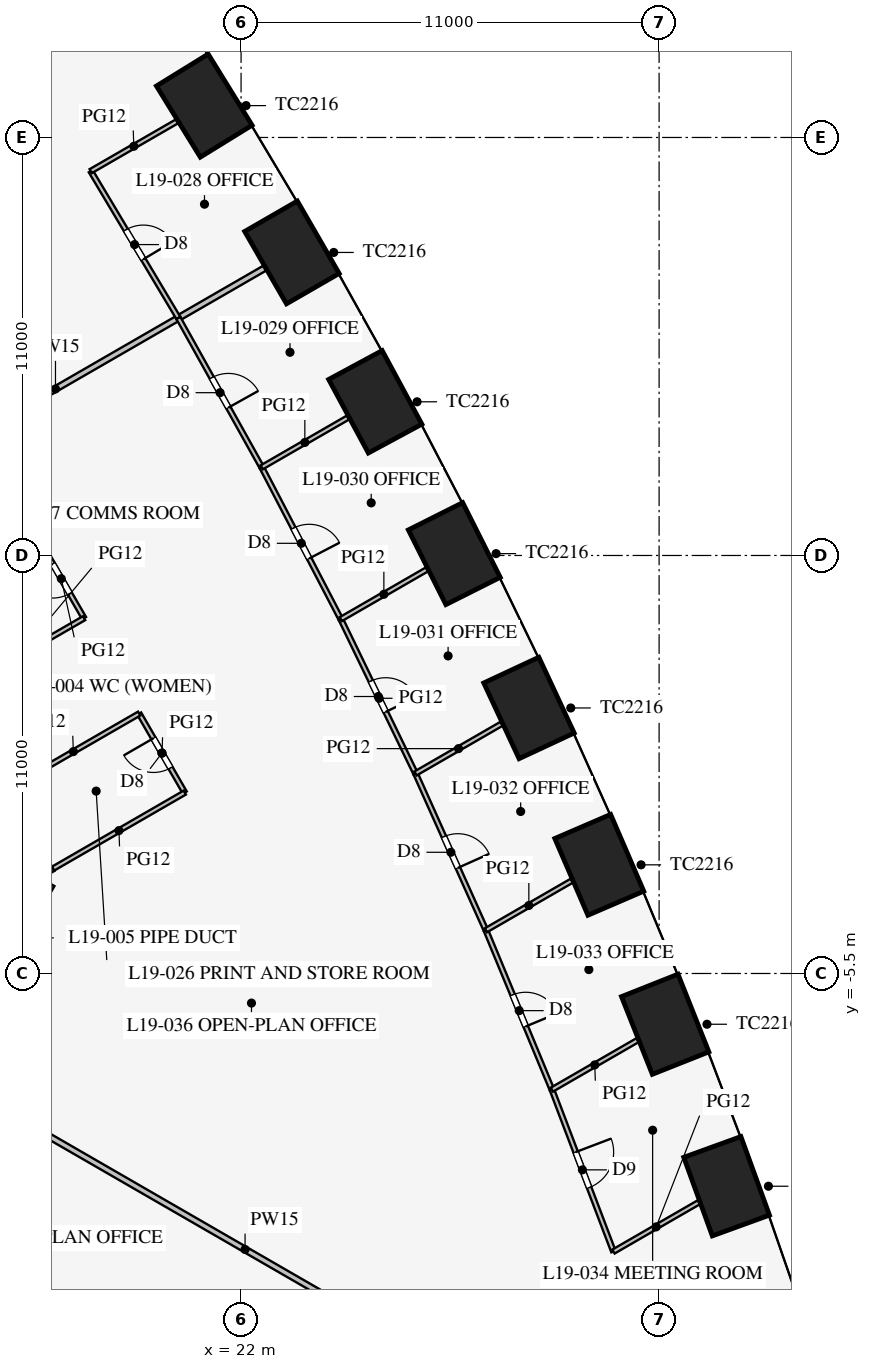
"""IFC4 building model, lengths in metres.
Left out: names, types, materials, properties, quantities, classifications, styles, units other than length and angle.
Written with IfcOpenShell. Run it as: python <this file> out.ifc"""

import sys

from ifc_helpers import new_model, si_unit, direction, frame, frame_2d, origin, origin_2d, place, context, subcontext, project, spatial, rectangle, extrude, element, fill, save


model = new_model("IFC4")
c1 = context("Model", 3, precision=1e-05, world=origin(), true_north=direction((0.0, 1.0)))
c2 = subcontext(c1, "Body", "Model", "MODEL_VIEW")
j1 = project(units=[si_unit("LENGTHUNIT", "METRE"), si_unit("PLANEANGLEUNIT", "RADIAN")], contexts=[c1])
p1 = place(None, origin())
s1 = spatial("IfcSite", under=j1, at=p1, CompositionType="ELEMENT")
p2 = place(p1, origin())
s2 = spatial("IfcBuilding", under=s1, at=p2, CompositionType="ELEMENT")
p3 = place(p2, frame((0.0, 0.0, 83.7)))
s3 = spatial("IfcBuildingStorey", under=s2, at=p3, CompositionType="ELEMENT", Elevation=83.7)
for number, where, z_axis, x_axis in (
    (1, (34.776, -11.099, 0.0), (0.0, 0.0, 1.0), (-0.342, 0.94, 0.0)),
    (2, (33.16, -6.836, 0.0), (0.0, 0.0, 1.0), (-0.369, 0.929, 0.0)),
    (3, (31.426, -2.641, 0.0), (0.0, 0.0, 1.0), (-0.396, 0.918, 0.0)),
    (4, (29.576, 1.487, 0.0), (0.0, 0.0, 1.0), (-0.423, 0.906, 0.0)),
    (5, (27.611, 5.549, 0.0), (0.0, 0.0, 1.0), (-0.449, 0.894, 0.0)),
    (6, (25.531, 9.544, 0.0), (0.0, 0.0, 1.0), (-0.475, 0.88, 0.0)),
    (7, (23.338, 13.474, 0.0), (0.0, 0.0, 1.0), (-0.5, 0.866, 0.0)),
    (8, (21.031, 17.339, 0.0), (0.0, 0.0, 1.0), (-0.525, 0.851, 0.0)),
):
    element("IfcColumn", number, at=place(p3, frame(where, z_axis=z_axis, x_axis=x_axis)), inside=s3, PredefinedType="COLUMN", context=c2, shape_type="SweptSolid", body=[
        extrude(rectangle(XDim=2.2, YDim=1.6, at=origin_2d()), origin(), (0.0, 0.0, 1.0), 4.2),
    ])
p4 = place(p3, frame((10.97, -13.0, 0.0), z_axis=(0.0, 0.0, 1.0), x_axis=(0.499995765644, 0.866027848477, 0.0)))
e9 = element("IfcWall", 9, at=p4, inside=s3, PredefinedType="SHEAR", context=c2, shape_type="SweptSolid", body=[
    extrude(rectangle(XDim=11.547, YDim=0.8, at=frame_2d((5.773, 0.0))), origin(), (0.0, 0.0, 1.0), 4.2),
])
p5 = place(p3, frame((16.743, -3.0, 0.0), z_axis=(0.0, 0.0, 1.0), x_axis=(-0.500002442456, 0.866023993627, 0.0)))
e10 = element("IfcWall", 10, at=p5, inside=s3, PredefinedType="SHEAR", context=c2, shape_type="SweptSolid", body=[
    extrude(rectangle(XDim=21.939, YDim=0.8, at=frame_2d((10.97, 0.0))), origin(), (0.0, 0.0, 1.0), 4.2),
])
p6 = place(p5, frame((17.27, 0.0, 0.0)))
e11 = element("IfcOpeningElement", 11, at=p6, cuts=e10, PredefinedType="OPENING", context=c2, shape_type="SweptSolid", body=[
    extrude(rectangle(XDim=1.2, YDim=2.1, at=frame_2d((0.6, 1.05))), frame((0.0, 0.41, 0.0), z_axis=(0.0, -1.0, 0.0), x_axis=(1.0, 0.0, 0.0)), (0.0, 0.0, 1.0), 0.82),
])
p7 = place(p5, frame((3.47, 0.0, 0.0)))
e12 = element("IfcOpeningElement", 12, at=p7, cuts=e10, PredefinedType="OPENING", context=c2, shape_type="SweptSolid", body=[
    extrude(rectangle(XDim=1.2, YDim=2.1, at=frame_2d((0.6, 1.05))), frame((0.0, 0.41, 0.0), z_axis=(0.0, -1.0, 0.0), x_axis=(1.0, 0.0, 0.0)), (0.0, 0.0, 1.0), 0.82),
])
p8 = place(p3, frame((14.203, -8.2, 0.0), z_axis=(0.0, 0.0, 1.0), x_axis=(0.866024965723, -0.500000758745, 0.0)))
e13 = element("IfcWall", 13, at=p8, inside=s3, PredefinedType="PARTITIONING", context=c2, shape_type="SweptSolid", body=[
    extrude(rectangle(XDim=18.25, YDim=0.15, at=frame_2d((9.125, 0.0))), origin(), (0.0, 0.0, 1.0), 2.3),
])
p9 = place(p3, frame((11.613, 6.705, 0.0), z_axis=(0.0, 0.0, 1.0), x_axis=(0.866029791586, 0.499992400027, 0.0)))
e14 = element("IfcWall", 14, at=p9, inside=s3, PredefinedType="PARTITIONING", context=c2, shape_type="SweptSolid", body=[
    extrude(rectangle(XDim=12.709, YDim=0.15, at=frame_2d((6.354, 0.0))), origin(), (0.0, 0.0, 1.0), 2.6),
])
p10 = place(p3, frame((20.519, -0.74, 0.0), z_axis=(0.0, 0.0, 1.0), x_axis=(-0.499957262057, 0.866050077142, 0.0)))
e15 = element("IfcWall", 15, at=p10, inside=s3, PredefinedType="PARTITIONING", context=c2, shape_type="SweptSolid", body=[
    extrude(rectangle(XDim=2.4, YDim=0.12, at=frame_2d((1.2, 0.0))), origin(), (0.0, 0.0, 1.0), 2.9),
])
p11 = place(p10, frame((0.75, 0.0, 0.15)))
e16 = element("IfcOpeningElement", 16, at=p11, cuts=e15, PredefinedType="OPENING", context=c2, shape_type="SweptSolid", body=[
    extrude(rectangle(XDim=0.9, YDim=2.1, at=frame_2d((0.45, 1.05))), frame((0.0, 0.07, 0.0), z_axis=(0.0, -1.0, 0.0), x_axis=(1.0, 0.0, 0.0)), (0.0, 0.0, 1.0), 0.14),
])
p12 = place(p3, frame((17.869, 3.85, 0.0), z_axis=(0.0, 0.0, 1.0), x_axis=(-0.500001309137, 0.866024647952, 0.0)))
e17 = element("IfcWall", 17, at=p12, inside=s3, PredefinedType="PARTITIONING", context=c2, shape_type="SweptSolid", body=[
    extrude(rectangle(XDim=2.4, YDim=0.12, at=frame_2d((1.2, 0.0))), origin(), (0.0, 0.0, 1.0), 2.9),
])
p13 = place(p12, frame((0.75, 0.0, 0.15)))
e18 = element("IfcOpeningElement", 18, at=p13, cuts=e17, PredefinedType="OPENING", context=c2, shape_type="SweptSolid", body=[
    extrude(rectangle(XDim=0.9, YDim=2.1, at=frame_2d((0.45, 1.05))), frame((0.0, 0.07, 0.0), z_axis=(0.0, -1.0, 0.0), x_axis=(1.0, 0.0, 0.0)), (0.0, 0.0, 1.0), 0.14),
])
for number, where, z_axis, x_axis in (
    (19, (17.055, -2.74, 0.0), (0.0, 0.0, 1.0), (0.866, 0.5, 0.0)),
    (20, (14.405, 1.85, 0.0), (0.0, 0.0, 1.0), (0.866, 0.5, 0.0)),
    (21, (15.855, -0.661, 0.0), (0.0, 0.0, 1.0), (0.866, 0.5, 0.0)),
):
    element("IfcWall", number, at=place(p3, frame(where, z_axis=z_axis, x_axis=x_axis)), inside=s3, PredefinedType="PARTITIONING", context=c2, shape_type="SweptSolid", body=[
        extrude(rectangle(XDim=4.0, YDim=0.12, at=frame_2d((2.0, 0.0))), origin(), (0.0, 0.0, 1.0), 2.9),
    ])
p14 = place(p3, frame((20.351, 11.749, 0.0), z_axis=(0.0, 0.0, 1.0), x_axis=(-0.51252396108, 0.858672923364, 0.0)))
e22 = element("IfcWall", 22, at=p14, inside=s3, PredefinedType="PARTITIONING", context=c2, shape_type="SweptSolid", body=[
    extrude(rectangle(XDim=4.5, YDim=0.12, at=frame_2d((2.25, 0.0))), origin(), (0.0, 0.0, 1.0), 2.9),
])
p15 = place(p14, frame((1.8, 0.0, 0.15)))
e23 = element("IfcOpeningElement", 23, at=p15, cuts=e22, PredefinedType="OPENING", context=c2, shape_type="SweptSolid", body=[
    extrude(rectangle(XDim=0.9, YDim=2.1, at=frame_2d((0.45, 1.05))), frame((0.0, 0.07, 0.0), z_axis=(0.0, -1.0, 0.0), x_axis=(1.0, 0.0, 0.0)), (0.0, 0.0, 1.0), 0.14),
])
p16 = place(p3, frame((26.591, -0.236, 0.0), z_axis=(0.0, 0.0, 1.0), x_axis=(-0.435857917556, 0.900015486369, 0.0)))
e24 = element("IfcWall", 24, at=p16, inside=s3, PredefinedType="PARTITIONING", context=c2, shape_type="SweptSolid", body=[
    extrude(rectangle(XDim=4.512, YDim=0.12, at=frame_2d((2.256, 0.0))), origin(), (0.0, 0.0, 1.0), 2.9),
])
p17 = place(p16, frame((1.8, 0.0, 0.15)))
e25 = element("IfcOpeningElement", 25, at=p17, cuts=e24, PredefinedType="OPENING", context=c2, shape_type="SweptSolid", body=[
    extrude(rectangle(XDim=0.9, YDim=2.1, at=frame_2d((0.45, 1.05))), frame((0.0, 0.07, 0.0), z_axis=(0.0, -1.0, 0.0), x_axis=(1.0, 0.0, 0.0)), (0.0, 0.0, 1.0), 0.14),
])
p18 = place(p3, frame((28.443, -4.363, 0.0), z_axis=(0.0, 0.0, 1.0), x_axis=(-0.409495979977, 0.912311921649, 0.0)))
e26 = element("IfcWall", 26, at=p18, inside=s3, PredefinedType="PARTITIONING", context=c2, shape_type="SweptSolid", body=[
    extrude(rectangle(XDim=4.523, YDim=0.12, at=frame_2d((2.262, 0.0))), origin(), (0.0, 0.0, 1.0), 2.9),
])
p19 = place(p18, frame((1.8, 0.0, 0.15)))
e27 = element("IfcOpeningElement", 27, at=p19, cuts=e26, PredefinedType="OPENING", context=c2, shape_type="SweptSolid", body=[
    extrude(rectangle(XDim=0.9, YDim=2.1, at=frame_2d((0.45, 1.05))), frame((0.0, 0.07, 0.0), z_axis=(0.0, -1.0, 0.0), x_axis=(1.0, 0.0, 0.0)), (0.0, 0.0, 1.0), 0.14),
])
p20 = place(p3, frame((30.179, -8.557, 0.0), z_axis=(0.0, 0.0, 1.0), x_axis=(-0.382594071331, 0.923916542001, 0.0)))
e28 = element("IfcWall", 28, at=p20, inside=s3, PredefinedType="PARTITIONING", context=c2, shape_type="SweptSolid", body=[
    extrude(rectangle(XDim=4.539, YDim=0.12, at=frame_2d((2.27, 0.0))), origin(), (0.0, 0.0, 1.0), 2.9),
])
p21 = place(p20, frame((1.8, 0.0, 0.15)))
e29 = element("IfcOpeningElement", 29, at=p21, cuts=e28, PredefinedType="OPENING", context=c2, shape_type="SweptSolid", body=[
    extrude(rectangle(XDim=0.9, YDim=2.1, at=frame_2d((0.45, 1.05))), frame((0.0, 0.07, 0.0), z_axis=(0.0, -1.0, 0.0), x_axis=(1.0, 0.0, 0.0)), (0.0, 0.0, 1.0), 0.14),
])
p22 = place(p3, frame((31.799, -12.817, 0.0), z_axis=(0.0, 0.0, 1.0), x_axis=(-0.355369393324, 0.934725946087, 0.0)))
e30 = element("IfcWall", 30, at=p22, inside=s3, PredefinedType="PARTITIONING", context=c2, shape_type="SweptSolid", body=[
    extrude(rectangle(XDim=4.558, YDim=0.12, at=frame_2d((2.279, 0.0))), origin(), (0.0, 0.0, 1.0), 2.9),
])
p23 = place(p22, frame((1.8, 0.0, 0.15)))
e31 = element("IfcOpeningElement", 31, at=p23, cuts=e30, PredefinedType="OPENING", context=c2, shape_type="SweptSolid", body=[
    extrude(rectangle(XDim=1.0, YDim=2.1, at=frame_2d((0.5, 1.05))), frame((0.0, 0.07, 0.0), z_axis=(0.0, -1.0, 0.0), x_axis=(1.0, 0.0, 0.0)), (0.0, 0.0, 1.0), 0.14),
])
p24 = place(p3, frame((22.544, 7.82, 0.0), z_axis=(0.0, 0.0, 1.0), x_axis=(-0.487373854787, 0.873193406795, 0.0)))
e32 = element("IfcWall", 32, at=p24, inside=s3, PredefinedType="PARTITIONING", context=c2, shape_type="SweptSolid", body=[
    extrude(rectangle(XDim=4.5, YDim=0.12, at=frame_2d((2.25, 0.0))), origin(), (0.0, 0.0, 1.0), 2.9),
])
p25 = place(p24, frame((1.8, 0.0, 0.15)))
e33 = element("IfcOpeningElement", 33, at=p25, cuts=e32, PredefinedType="OPENING", context=c2, shape_type="SweptSolid", body=[
    extrude(rectangle(XDim=0.9, YDim=2.1, at=frame_2d((0.45, 1.05))), frame((0.0, 0.07, 0.0), z_axis=(0.0, -1.0, 0.0), x_axis=(1.0, 0.0, 0.0)), (0.0, 0.0, 1.0), 0.14),
])
p26 = place(p3, frame((24.624, 3.824, 0.0), z_axis=(0.0, 0.0, 1.0), x_axis=(-0.461810056307, 0.886978845235, 0.0)))
e34 = element("IfcWall", 34, at=p26, inside=s3, PredefinedType="PARTITIONING", context=c2, shape_type="SweptSolid", body=[
    extrude(rectangle(XDim=4.504, YDim=0.12, at=frame_2d((2.252, 0.0))), origin(), (0.0, 0.0, 1.0), 2.9),
])
p27 = place(p26, frame((1.8, 0.0, 0.15)))
e35 = element("IfcOpeningElement", 35, at=p27, cuts=e34, PredefinedType="OPENING", context=c2, shape_type="SweptSolid", body=[
    extrude(rectangle(XDim=0.9, YDim=2.1, at=frame_2d((0.45, 1.05))), frame((0.0, 0.07, 0.0), z_axis=(0.0, -1.0, 0.0), x_axis=(1.0, 0.0, 0.0)), (0.0, 0.0, 1.0), 0.14),
])
p28 = place(p3, frame((18.044, 15.614, 0.0), z_axis=(0.0, 0.0, 1.0), x_axis=(0.865991553875, 0.500058625179, 0.0)))
e36 = element("IfcWall", 36, at=p28, inside=s3, PredefinedType="PARTITIONING", context=c2, shape_type="SweptSolid", body=[
    extrude(rectangle(XDim=2.619, YDim=0.12, at=frame_2d((1.31, 0.0))), origin(), (0.0, 0.0, 1.0), 2.6),
])
p29 = place(p3, frame((26.591, -0.236, 0.0), z_axis=(0.0, 0.0, 1.0), x_axis=(0.866033156767, 0.499986571201, 0.0)))
e37 = element("IfcWall", 37, at=p29, inside=s3, PredefinedType="PARTITIONING", context=c2, shape_type="SweptSolid", body=[
    extrude(rectangle(XDim=2.614, YDim=0.12, at=frame_2d((1.307, 0.0))), origin(), (0.0, 0.0, 1.0), 2.4),
])
p30 = place(p3, frame((28.443, -4.363, 0.0), z_axis=(0.0, 0.0, 1.0), x_axis=(0.866017274468, 0.500014080125, 0.0)))
e38 = element("IfcWall", 38, at=p30, inside=s3, PredefinedType="PARTITIONING", context=c2, shape_type="SweptSolid", body=[
    extrude(rectangle(XDim=2.609, YDim=0.12, at=frame_2d((1.304, 0.0))), origin(), (0.0, 0.0, 1.0), 2.4),
])
p31 = place(p3, frame((30.179, -8.557, 0.0), z_axis=(0.0, 0.0, 1.0), x_axis=(0.866052820039, 0.499952510647, 0.0)))
e39 = element("IfcWall", 39, at=p31, inside=s3, PredefinedType="PARTITIONING", context=c2, shape_type="SweptSolid", body=[
    extrude(rectangle(XDim=2.603, YDim=0.12, at=frame_2d((1.301, 0.0))), origin(), (0.0, 0.0, 1.0), 2.6),
])
p32 = place(p3, frame((31.799, -12.817, 0.0), z_axis=(0.0, 0.0, 1.0), x_axis=(0.866046148833, 0.4999640668, 0.0)))
e40 = element("IfcWall", 40, at=p32, inside=s3, PredefinedType="PARTITIONING", context=c2, shape_type="SweptSolid", body=[
    extrude(rectangle(XDim=2.595, YDim=0.12, at=frame_2d((1.297, 0.0))), origin(), (0.0, 0.0, 1.0), 2.9),
])
p33 = place(p3, frame((22.544, 7.82, 0.0), z_axis=(0.0, 0.0, 1.0), x_axis=(0.866031916153, 0.499988720078, 0.0)))
e41 = element("IfcWall", 41, at=p33, inside=s3, PredefinedType="PARTITIONING", context=c2, shape_type="SweptSolid", body=[
    extrude(rectangle(XDim=2.619, YDim=0.12, at=frame_2d((1.31, 0.0))), origin(), (0.0, 0.0, 1.0), 2.6),
])
p34 = place(p3, frame((24.624, 3.824, 0.0), z_axis=(0.0, 0.0, 1.0), x_axis=(0.866053563643, 0.499951222523, 0.0)))
e42 = element("IfcWall", 42, at=p34, inside=s3, PredefinedType="PARTITIONING", context=c2, shape_type="SweptSolid", body=[
    extrude(rectangle(XDim=2.617, YDim=0.12, at=frame_2d((1.309, 0.0))), origin(), (0.0, 0.0, 1.0), 2.6),
])
p35 = place(p11, origin())
e43 = element("IfcDoor", 43, at=p35, inside=s3, OperationType="SINGLE_SWING_RIGHT", PredefinedType="DOOR", context=c2, shape_type="SweptSolid", body=[
    extrude(rectangle(XDim=0.9, YDim=2.1, at=frame_2d((0.45, 1.05))), frame((0.0, 0.025, 0.0), z_axis=(0.0, -1.0, 0.0), x_axis=(1.0, 0.0, 0.0)), (0.0, 0.0, 1.0), 0.05),
])
fill(e16, e43)
p36 = place(p13, origin())
e44 = element("IfcDoor", 44, at=p36, inside=s3, OperationType="SINGLE_SWING_RIGHT", PredefinedType="DOOR", context=c2, shape_type="SweptSolid", body=[
    extrude(rectangle(XDim=0.9, YDim=2.1, at=frame_2d((0.45, 1.05))), frame((0.0, 0.025, 0.0), z_axis=(0.0, -1.0, 0.0), x_axis=(1.0, 0.0, 0.0)), (0.0, 0.0, 1.0), 0.05),
])
fill(e18, e44)
p37 = place(p15, frame((0.9, 0.0, 0.0), z_axis=(0.0, 0.0, 1.0), x_axis=(-1.0, 0.0, 0.0)))
e45 = element("IfcDoor", 45, at=p37, inside=s3, OperationType="SINGLE_SWING_RIGHT", PredefinedType="DOOR", context=c2, shape_type="SweptSolid", body=[
    extrude(rectangle(XDim=0.9, YDim=2.1, at=frame_2d((0.45, 1.05))), frame((0.0, 0.025, 0.0), z_axis=(0.0, -1.0, 0.0), x_axis=(1.0, 0.0, 0.0)), (0.0, 0.0, 1.0), 0.05),
])
fill(e23, e45)
p38 = place(p25, frame((0.9, 0.0, 0.0), z_axis=(0.0, 0.0, 1.0), x_axis=(-1.0, 0.0, 0.0)))
e46 = element("IfcDoor", 46, at=p38, inside=s3, OperationType="SINGLE_SWING_RIGHT", PredefinedType="DOOR", context=c2, shape_type="SweptSolid", body=[
    extrude(rectangle(XDim=0.9, YDim=2.1, at=frame_2d((0.45, 1.05))), frame((0.0, 0.025, 0.0), z_axis=(0.0, -1.0, 0.0), x_axis=(1.0, 0.0, 0.0)), (0.0, 0.0, 1.0), 0.05),
])
fill(e33, e46)
p39 = place(p27, frame((0.9, 0.0, 0.0), z_axis=(0.0, 0.0, 1.0), x_axis=(-1.0, 0.0, 0.0)))
e47 = element("IfcDoor", 47, at=p39, inside=s3, OperationType="SINGLE_SWING_RIGHT", PredefinedType="DOOR", context=c2, shape_type="SweptSolid", body=[
    extrude(rectangle(XDim=0.9, YDim=2.1, at=frame_2d((0.45, 1.05))), frame((0.0, 0.025, 0.0), z_axis=(0.0, -1.0, 0.0), x_axis=(1.0, 0.0, 0.0)), (0.0, 0.0, 1.0), 0.05),
])
fill(e35, e47)
p40 = place(p17, frame((0.9, 0.0, 0.0), z_axis=(0.0, 0.0, 1.0), x_axis=(-1.0, 0.0, 0.0)))
e48 = element("IfcDoor", 48, at=p40, inside=s3, OperationType="SINGLE_SWING_RIGHT", PredefinedType="DOOR", context=c2, shape_type="SweptSolid", body=[
    extrude(rectangle(XDim=0.9, YDim=2.1, at=frame_2d((0.45, 1.05))), frame((0.0, 0.025, 0.0), z_axis=(0.0, -1.0, 0.0), x_axis=(1.0, 0.0, 0.0)), (0.0, 0.0, 1.0), 0.05),
])
fill(e25, e48)
p41 = place(p19, frame((0.9, 0.0, 0.0), z_axis=(0.0, 0.0, 1.0), x_axis=(-1.0, 0.0, 0.0)))
e49 = element("IfcDoor", 49, at=p41, inside=s3, OperationType="SINGLE_SWING_RIGHT", PredefinedType="DOOR", context=c2, shape_type="SweptSolid", body=[
    extrude(rectangle(XDim=0.9, YDim=2.1, at=frame_2d((0.45, 1.05))), frame((0.0, 0.025, 0.0), z_axis=(0.0, -1.0, 0.0), x_axis=(1.0, 0.0, 0.0)), (0.0, 0.0, 1.0), 0.05),
])
fill(e27, e49)
p42 = place(p21, frame((0.9, 0.0, 0.0), z_axis=(0.0, 0.0, 1.0), x_axis=(-1.0, 0.0, 0.0)))
e50 = element("IfcDoor", 50, at=p42, inside=s3, OperationType="SINGLE_SWING_RIGHT", PredefinedType="DOOR", context=c2, shape_type="SweptSolid", body=[
    extrude(rectangle(XDim=0.9, YDim=2.1, at=frame_2d((0.45, 1.05))), frame((0.0, 0.025, 0.0), z_axis=(0.0, -1.0, 0.0), x_axis=(1.0, 0.0, 0.0)), (0.0, 0.0, 1.0), 0.05),
])
fill(e29, e50)
p43 = place(p23, frame((1.0, 0.0, 0.0), z_axis=(0.0, 0.0, 1.0), x_axis=(-1.0, 0.0, 0.0)))
e51 = element("IfcDoor", 51, at=p43, inside=s3, OperationType="SINGLE_SWING_LEFT", PredefinedType="DOOR", context=c2, shape_type="SweptSolid", body=[
    extrude(rectangle(XDim=1.0, YDim=2.1, at=frame_2d((0.5, 1.05))), frame((0.0, 0.025, 0.0), z_axis=(0.0, -1.0, 0.0), x_axis=(1.0, 0.0, 0.0)), (0.0, 0.0, 1.0), 0.05),
])
fill(e31, e51)
save(model, sys.argv[1])
